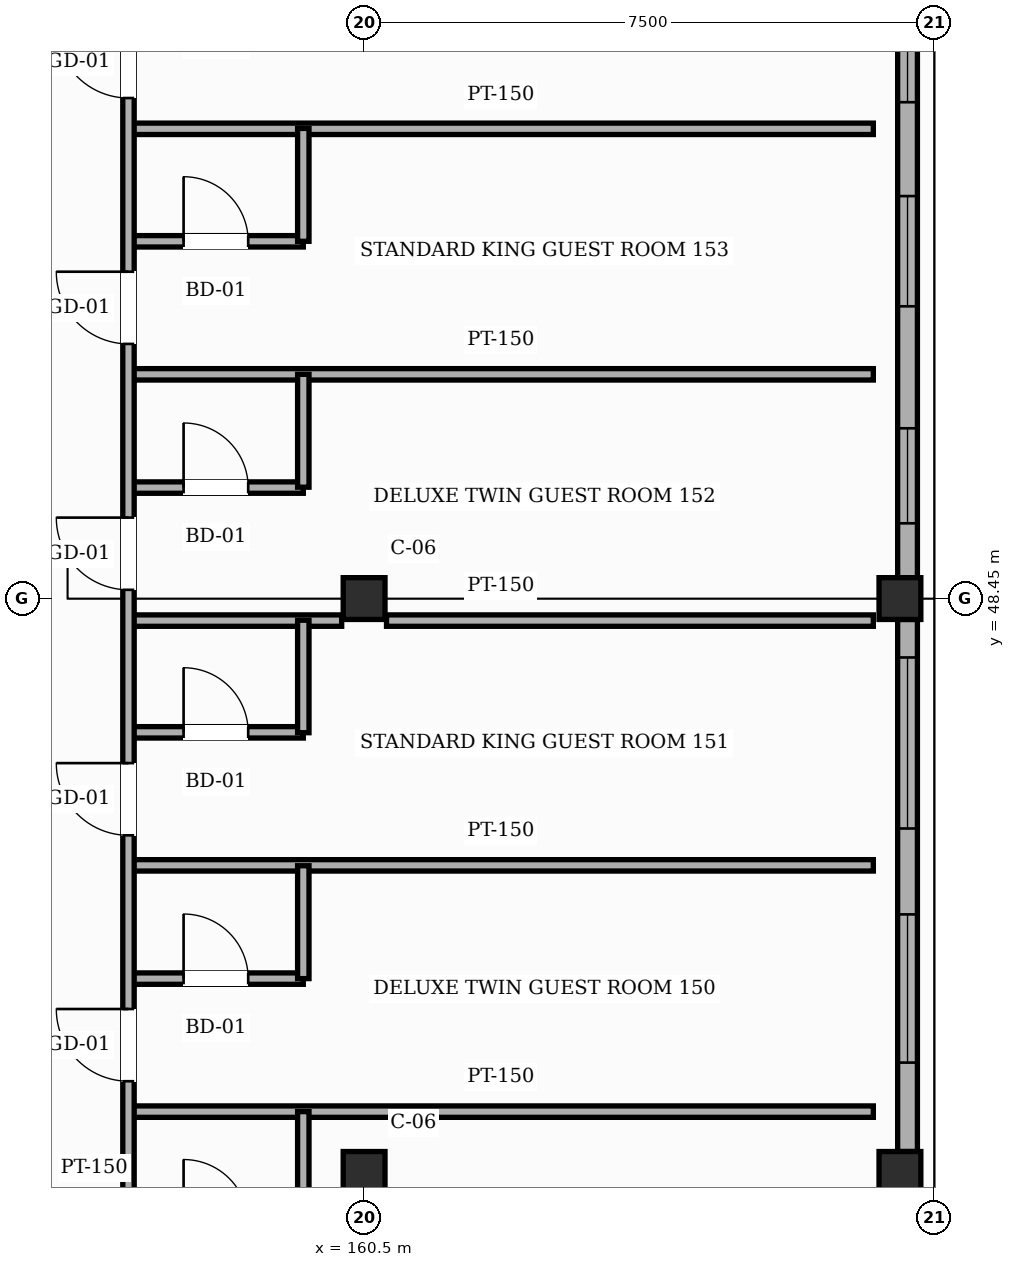
"""IFC4 building model, lengths in metres.
Left out: names, types, materials, properties, quantities, classifications, styles, units other than length and angle.
Written with IfcOpenShell. Run it as: python <this file> out.ifc"""

import sys

from ifc_helpers import new_model, si_unit, direction, frame, frame_2d, origin, origin_2d, place, context, subcontext, project, spatial, rectangle, hollow_rectangle, extrude, element, fill, save


model = new_model("IFC4")
c1 = context("Model", 3, precision=1e-05, world=origin(), true_north=direction((0.0, 1.0)))
c2 = subcontext(c1, "Body", "Model", "MODEL_VIEW")
j1 = project(units=[si_unit("LENGTHUNIT", "METRE"), si_unit("PLANEANGLEUNIT", "RADIAN")], contexts=[c1])
p1 = place(None, origin())
s1 = spatial("IfcSite", under=j1, at=p1, CompositionType="ELEMENT")
p2 = place(p1, origin())
s2 = spatial("IfcBuilding", under=s1, at=p2, CompositionType="ELEMENT")
p3 = place(p2, frame((0.0, 0.0, 28.2)))
s3 = spatial("IfcBuildingStorey", under=s2, at=p3, CompositionType="ELEMENT", Elevation=28.2)
for number, where, z_axis, x_axis in (
    (1, (160.5, 40.9, 0.0), (0.0, 0.0, 1.0), (1.0, 0.0, 0.0)),
    (2, (160.5, 48.45, 0.0), (0.0, 0.0, 1.0), (1.0, 0.0, 0.0)),
    (3, (167.55, 40.9, 0.0), (0.0, 0.0, 1.0), (1.0, 0.0, 0.0)),
    (4, (167.55, 48.45, 0.0), (0.0, 0.0, 1.0), (1.0, 0.0, 0.0)),
):
    element("IfcColumn", number, at=place(p3, frame(where, z_axis=z_axis, x_axis=x_axis)), inside=s3, PredefinedType="COLUMN", context=c2, shape_type="SweptSolid", body=[
        extrude(hollow_rectangle(XDim=0.55, YDim=0.55, WallThickness=0.022, InnerFilletRadius=0.022, OuterFilletRadius=0.044, at=origin_2d()), origin(), (0.0, 0.0, 1.0), 3.6),
    ])
p4 = place(p3, frame((167.65, 48.175, 0.0), z_axis=(0.0, 0.0, 1.0), x_axis=(0.0, -1.0, 0.0)))
e5 = element("IfcWall", 5, at=p4, inside=s3, PredefinedType="SOLIDWALL", context=c2, shape_type="SweptSolid", body=[
    extrude(rectangle(XDim=7.0, YDim=0.26, at=frame_2d((3.5, 0.0))), origin(), (0.0, 0.0, 1.0), 2.755),
])
p5 = place(p4, frame((3.88, 0.0, 0.85)))
e6 = element("IfcOpeningElement", 6, at=p5, cuts=e5, PredefinedType="OPENING", context=c2, shape_type="SweptSolid", body=[
    extrude(rectangle(XDim=1.95, YDim=1.5, at=frame_2d((0.975, 0.75))), frame((0.0, 0.14, 0.0), z_axis=(0.0, -1.0, 0.0), x_axis=(1.0, 0.0, 0.0)), (0.0, 0.0, 1.0), 0.28),
])
p6 = place(p4, frame((0.5, 0.0, 0.85)))
e7 = element("IfcOpeningElement", 7, at=p6, cuts=e5, PredefinedType="OPENING", context=c2, shape_type="SweptSolid", body=[
    extrude(rectangle(XDim=2.25, YDim=1.5, at=frame_2d((1.125, 0.75))), frame((0.0, 0.14, 0.0), z_axis=(0.0, -1.0, 0.0), x_axis=(1.0, 0.0, 0.0)), (0.0, 0.0, 1.0), 0.28),
])
p7 = place(p3, frame((167.65, 56.175, 0.0), z_axis=(0.0, 0.0, 1.0), x_axis=(0.0, -1.0, 0.0)))
e8 = element("IfcWall", 8, at=p7, inside=s3, PredefinedType="SOLIDWALL", context=c2, shape_type="SweptSolid", body=[
    extrude(rectangle(XDim=7.45, YDim=0.26, at=frame_2d((3.725, 0.0))), origin(), (0.0, 0.0, 1.0), 2.755),
])
p8 = place(p7, frame((5.485, 0.0, 0.85)))
e9 = element("IfcOpeningElement", 9, at=p8, cuts=e8, PredefinedType="OPENING", context=c2, shape_type="SweptSolid", body=[
    extrude(rectangle(XDim=1.25, YDim=1.65, at=frame_2d((0.625, 0.825))), frame((0.0, 0.14, 0.0), z_axis=(0.0, -1.0, 0.0), x_axis=(1.0, 0.0, 0.0)), (0.0, 0.0, 1.0), 0.28),
])
p9 = place(p7, frame((2.43, 0.0, 0.85)))
e10 = element("IfcOpeningElement", 10, at=p9, cuts=e8, PredefinedType="OPENING", context=c2, shape_type="SweptSolid", body=[
    extrude(rectangle(XDim=1.45, YDim=1.65, at=frame_2d((0.725, 0.825))), frame((0.0, 0.14, 0.0), z_axis=(0.0, -1.0, 0.0), x_axis=(1.0, 0.0, 0.0)), (0.0, 0.0, 1.0), 0.28),
])
p10 = place(p7, frame((0.345, 0.0, 0.85)))
e11 = element("IfcOpeningElement", 11, at=p10, cuts=e8, PredefinedType="OPENING", context=c2, shape_type="SweptSolid", body=[
    extrude(rectangle(XDim=0.85, YDim=1.35, at=frame_2d((0.425, 0.675))), frame((0.0, 0.14, 0.0), z_axis=(0.0, -1.0, 0.0), x_axis=(1.0, 0.0, 0.0)), (0.0, 0.0, 1.0), 0.28),
])
p11 = place(p3, frame((157.4, 41.7, 0.0), z_axis=(0.0, 0.0, 1.0), x_axis=(1.0, 0.0, 0.0)))
e12 = element("IfcWall", 12, at=p11, inside=s3, PredefinedType="PARTITIONING", context=c2, shape_type="SweptSolid", body=[
    extrude(rectangle(XDim=9.8, YDim=0.15, at=frame_2d((4.9, 0.0))), origin(), (0.0, 0.0, 1.0), 3.365),
])
p12 = place(p3, frame((157.4, 43.45, 0.0), z_axis=(0.0, 0.0, 1.0), x_axis=(1.0, 0.0, 0.0)))
e13 = element("IfcWall", 13, at=p12, inside=s3, PredefinedType="PARTITIONING", context=c2, shape_type="SweptSolid", body=[
    extrude(rectangle(XDim=2.3, YDim=0.15, at=frame_2d((1.15, 0.0))), origin(), (0.0, 0.0, 1.0), 3.365),
])
p13 = place(p12, frame((0.725, 0.0, 0.0)))
e14 = element("IfcOpeningElement", 14, at=p13, cuts=e13, PredefinedType="OPENING", context=c2, shape_type="SweptSolid", body=[
    extrude(rectangle(XDim=0.85, YDim=2.1, at=frame_2d((0.425, 1.05))), frame((0.0, 0.085, 0.0), z_axis=(0.0, -1.0, 0.0), x_axis=(1.0, 0.0, 0.0)), (0.0, 0.0, 1.0), 0.17),
])
p14 = place(p3, frame((157.4, 44.94, 0.0), z_axis=(0.0, 0.0, 1.0), x_axis=(1.0, 0.0, 0.0)))
e15 = element("IfcWall", 15, at=p14, inside=s3, PredefinedType="PARTITIONING", context=c2, shape_type="SweptSolid", body=[
    extrude(rectangle(XDim=9.8, YDim=0.15, at=frame_2d((4.9, 0.0))), origin(), (0.0, 0.0, 1.0), 3.055),
])
p15 = place(p3, frame((157.4, 46.69, 0.0), z_axis=(0.0, 0.0, 1.0), x_axis=(1.0, 0.0, 0.0)))
e16 = element("IfcWall", 16, at=p15, inside=s3, PredefinedType="PARTITIONING", context=c2, shape_type="SweptSolid", body=[
    extrude(rectangle(XDim=2.3, YDim=0.15, at=frame_2d((1.15, 0.0))), origin(), (0.0, 0.0, 1.0), 3.365),
])
p16 = place(p15, frame((0.725, 0.0, 0.0)))
e17 = element("IfcOpeningElement", 17, at=p16, cuts=e16, PredefinedType="OPENING", context=c2, shape_type="SweptSolid", body=[
    extrude(rectangle(XDim=0.85, YDim=2.1, at=frame_2d((0.425, 1.05))), frame((0.0, 0.085, 0.0), z_axis=(0.0, -1.0, 0.0), x_axis=(1.0, 0.0, 0.0)), (0.0, 0.0, 1.0), 0.17),
])
p17 = place(p3, frame((157.4, 48.16, 0.0), z_axis=(0.0, 0.0, 1.0), x_axis=(1.0, 0.0, 0.0)))
e18 = element("IfcWall", 18, at=p17, inside=s3, PredefinedType="PARTITIONING", context=c2, shape_type="SweptSolid", body=[
    extrude(rectangle(XDim=2.805, YDim=0.15, at=frame_2d((1.403, 0.0))), origin(), (0.0, 0.0, 1.0), 3.365),
])
p18 = place(p3, frame((160.795, 48.16, 0.0), z_axis=(0.0, 0.0, 1.0), x_axis=(1.0, 0.0, 0.0)))
e19 = element("IfcWall", 19, at=p18, inside=s3, PredefinedType="PARTITIONING", context=c2, shape_type="SweptSolid", body=[
    extrude(rectangle(XDim=6.405, YDim=0.15, at=frame_2d((3.203, 0.0))), origin(), (0.0, 0.0, 1.0), 2.755),
])
p19 = place(p3, frame((157.4, 49.91, 0.0), z_axis=(0.0, 0.0, 1.0), x_axis=(1.0, 0.0, 0.0)))
e20 = element("IfcWall", 20, at=p19, inside=s3, PredefinedType="PARTITIONING", context=c2, shape_type="SweptSolid", body=[
    extrude(rectangle(XDim=2.3, YDim=0.15, at=frame_2d((1.15, 0.0))), origin(), (0.0, 0.0, 1.0), 3.365),
])
p20 = place(p19, frame((0.725, 0.0, 0.0)))
e21 = element("IfcOpeningElement", 21, at=p20, cuts=e20, PredefinedType="OPENING", context=c2, shape_type="SweptSolid", body=[
    extrude(rectangle(XDim=0.85, YDim=2.1, at=frame_2d((0.425, 1.05))), frame((0.0, 0.085, 0.0), z_axis=(0.0, -1.0, 0.0), x_axis=(1.0, 0.0, 0.0)), (0.0, 0.0, 1.0), 0.17),
])
p21 = place(p3, frame((157.4, 51.4, 0.0), z_axis=(0.0, 0.0, 1.0), x_axis=(1.0, 0.0, 0.0)))
e22 = element("IfcWall", 22, at=p21, inside=s3, PredefinedType="PARTITIONING", context=c2, shape_type="SweptSolid", body=[
    extrude(rectangle(XDim=9.8, YDim=0.15, at=frame_2d((4.9, 0.0))), origin(), (0.0, 0.0, 1.0), 3.365),
])
p22 = place(p3, frame((157.4, 53.15, 0.0), z_axis=(0.0, 0.0, 1.0), x_axis=(1.0, 0.0, 0.0)))
e23 = element("IfcWall", 23, at=p22, inside=s3, PredefinedType="PARTITIONING", context=c2, shape_type="SweptSolid", body=[
    extrude(rectangle(XDim=2.3, YDim=0.15, at=frame_2d((1.15, 0.0))), origin(), (0.0, 0.0, 1.0), 3.365),
])
p23 = place(p22, frame((0.725, 0.0, 0.0)))
e24 = element("IfcOpeningElement", 24, at=p23, cuts=e23, PredefinedType="OPENING", context=c2, shape_type="SweptSolid", body=[
    extrude(rectangle(XDim=0.85, YDim=2.1, at=frame_2d((0.425, 1.05))), frame((0.0, 0.085, 0.0), z_axis=(0.0, -1.0, 0.0), x_axis=(1.0, 0.0, 0.0)), (0.0, 0.0, 1.0), 0.17),
])
p24 = place(p3, frame((157.4, 54.63, 0.0), z_axis=(0.0, 0.0, 1.0), x_axis=(1.0, 0.0, 0.0)))
e25 = element("IfcWall", 25, at=p24, inside=s3, PredefinedType="PARTITIONING", context=c2, shape_type="SweptSolid", body=[
    extrude(rectangle(XDim=9.8, YDim=0.15, at=frame_2d((4.9, 0.0))), origin(), (0.0, 0.0, 1.0), 3.365),
])
p25 = place(p3, frame((157.4, 22.3, 0.0), z_axis=(0.0, 0.0, 1.0), x_axis=(0.0, 1.0, 0.0)))
e26 = element("IfcWall", 26, at=p25, inside=s3, PredefinedType="PARTITIONING", context=c2, shape_type="SweptSolid", body=[
    extrude(rectangle(XDim=48.5, YDim=0.15, at=frame_2d((24.25, 0.0))), origin(), (0.0, 0.0, 1.0), 3.365),
])
p26 = place(p25, frame((0.325, 0.0, 0.0)))
e27 = element("IfcOpeningElement", 27, at=p26, cuts=e26, PredefinedType="OPENING", context=c2, shape_type="SweptSolid", body=[
    extrude(rectangle(XDim=1.1, YDim=2.2, at=frame_2d((0.55, 1.1))), frame((0.0, 0.085, 0.0), z_axis=(0.0, -1.0, 0.0), x_axis=(1.0, 0.0, 0.0)), (0.0, 0.0, 1.0), 0.17),
])
p27 = place(p25, frame((3.635, 0.0, 0.0)))
e28 = element("IfcOpeningElement", 28, at=p27, cuts=e26, PredefinedType="OPENING", context=c2, shape_type="SweptSolid", body=[
    extrude(rectangle(XDim=0.95, YDim=2.15, at=frame_2d((0.475, 1.075))), frame((0.0, 0.085, 0.0), z_axis=(0.0, -1.0, 0.0), x_axis=(1.0, 0.0, 0.0)), (0.0, 0.0, 1.0), 0.17),
])
p28 = place(p25, frame((6.865, 0.0, 0.0)))
e29 = element("IfcOpeningElement", 29, at=p28, cuts=e26, PredefinedType="OPENING", context=c2, shape_type="SweptSolid", body=[
    extrude(rectangle(XDim=0.95, YDim=2.15, at=frame_2d((0.475, 1.075))), frame((0.0, 0.085, 0.0), z_axis=(0.0, -1.0, 0.0), x_axis=(1.0, 0.0, 0.0)), (0.0, 0.0, 1.0), 0.17),
])
p29 = place(p25, frame((10.1, 0.0, 0.0)))
e30 = element("IfcOpeningElement", 30, at=p29, cuts=e26, PredefinedType="OPENING", context=c2, shape_type="SweptSolid", body=[
    extrude(rectangle(XDim=0.95, YDim=2.15, at=frame_2d((0.475, 1.075))), frame((0.0, 0.085, 0.0), z_axis=(0.0, -1.0, 0.0), x_axis=(1.0, 0.0, 0.0)), (0.0, 0.0, 1.0), 0.17),
])
p30 = place(p25, frame((13.335, 0.0, 0.0)))
e31 = element("IfcOpeningElement", 31, at=p30, cuts=e26, PredefinedType="OPENING", context=c2, shape_type="SweptSolid", body=[
    extrude(rectangle(XDim=0.95, YDim=2.15, at=frame_2d((0.475, 1.075))), frame((0.0, 0.085, 0.0), z_axis=(0.0, -1.0, 0.0), x_axis=(1.0, 0.0, 0.0)), (0.0, 0.0, 1.0), 0.17),
])
p31 = place(p25, frame((16.565, 0.0, 0.0)))
e32 = element("IfcOpeningElement", 32, at=p31, cuts=e26, PredefinedType="OPENING", context=c2, shape_type="SweptSolid", body=[
    extrude(rectangle(XDim=0.95, YDim=2.15, at=frame_2d((0.475, 1.075))), frame((0.0, 0.085, 0.0), z_axis=(0.0, -1.0, 0.0), x_axis=(1.0, 0.0, 0.0)), (0.0, 0.0, 1.0), 0.17),
])
p32 = place(p25, frame((19.8, 0.0, 0.0)))
e33 = element("IfcOpeningElement", 33, at=p32, cuts=e26, PredefinedType="OPENING", context=c2, shape_type="SweptSolid", body=[
    extrude(rectangle(XDim=0.95, YDim=2.15, at=frame_2d((0.475, 1.075))), frame((0.0, 0.085, 0.0), z_axis=(0.0, -1.0, 0.0), x_axis=(1.0, 0.0, 0.0)), (0.0, 0.0, 1.0), 0.17),
])
p33 = place(p25, frame((23.035, 0.0, 0.0)))
e34 = element("IfcOpeningElement", 34, at=p33, cuts=e26, PredefinedType="OPENING", context=c2, shape_type="SweptSolid", body=[
    extrude(rectangle(XDim=0.95, YDim=2.15, at=frame_2d((0.475, 1.075))), frame((0.0, 0.085, 0.0), z_axis=(0.0, -1.0, 0.0), x_axis=(1.0, 0.0, 0.0)), (0.0, 0.0, 1.0), 0.17),
])
p34 = place(p25, frame((26.265, 0.0, 0.0)))
e35 = element("IfcOpeningElement", 35, at=p34, cuts=e26, PredefinedType="OPENING", context=c2, shape_type="SweptSolid", body=[
    extrude(rectangle(XDim=0.95, YDim=2.15, at=frame_2d((0.475, 1.075))), frame((0.0, 0.085, 0.0), z_axis=(0.0, -1.0, 0.0), x_axis=(1.0, 0.0, 0.0)), (0.0, 0.0, 1.0), 0.17),
])
p35 = place(p25, frame((29.5, 0.0, 0.0)))
e36 = element("IfcOpeningElement", 36, at=p35, cuts=e26, PredefinedType="OPENING", context=c2, shape_type="SweptSolid", body=[
    extrude(rectangle(XDim=0.95, YDim=2.15, at=frame_2d((0.475, 1.075))), frame((0.0, 0.085, 0.0), z_axis=(0.0, -1.0, 0.0), x_axis=(1.0, 0.0, 0.0)), (0.0, 0.0, 1.0), 0.17),
])
p36 = place(p25, frame((32.735, 0.0, 0.0)))
e37 = element("IfcOpeningElement", 37, at=p36, cuts=e26, PredefinedType="OPENING", context=c2, shape_type="SweptSolid", body=[
    extrude(rectangle(XDim=0.95, YDim=2.15, at=frame_2d((0.475, 1.075))), frame((0.0, 0.085, 0.0), z_axis=(0.0, -1.0, 0.0), x_axis=(1.0, 0.0, 0.0)), (0.0, 0.0, 1.0), 0.17),
])
p37 = place(p25, frame((35.965, 0.0, 0.0)))
e38 = element("IfcOpeningElement", 38, at=p37, cuts=e26, PredefinedType="OPENING", context=c2, shape_type="SweptSolid", body=[
    extrude(rectangle(XDim=0.95, YDim=2.15, at=frame_2d((0.475, 1.075))), frame((0.0, 0.085, 0.0), z_axis=(0.0, -1.0, 0.0), x_axis=(1.0, 0.0, 0.0)), (0.0, 0.0, 1.0), 0.17),
])
p38 = place(p25, frame((39.2, 0.0, 0.0)))
e39 = element("IfcOpeningElement", 39, at=p38, cuts=e26, PredefinedType="OPENING", context=c2, shape_type="SweptSolid", body=[
    extrude(rectangle(XDim=0.95, YDim=2.15, at=frame_2d((0.475, 1.075))), frame((0.0, 0.085, 0.0), z_axis=(0.0, -1.0, 0.0), x_axis=(1.0, 0.0, 0.0)), (0.0, 0.0, 1.0), 0.17),
])
p39 = place(p25, frame((42.435, 0.0, 0.0)))
e40 = element("IfcOpeningElement", 40, at=p39, cuts=e26, PredefinedType="OPENING", context=c2, shape_type="SweptSolid", body=[
    extrude(rectangle(XDim=0.95, YDim=2.15, at=frame_2d((0.475, 1.075))), frame((0.0, 0.085, 0.0), z_axis=(0.0, -1.0, 0.0), x_axis=(1.0, 0.0, 0.0)), (0.0, 0.0, 1.0), 0.17),
])
p40 = place(p25, frame((45.665, 0.0, 0.0)))
e41 = element("IfcOpeningElement", 41, at=p40, cuts=e26, PredefinedType="OPENING", context=c2, shape_type="SweptSolid", body=[
    extrude(rectangle(XDim=0.95, YDim=2.15, at=frame_2d((0.475, 1.075))), frame((0.0, 0.085, 0.0), z_axis=(0.0, -1.0, 0.0), x_axis=(1.0, 0.0, 0.0)), (0.0, 0.0, 1.0), 0.17),
])
p41 = place(p3, frame((159.7, 40.215, 0.0), z_axis=(0.0, 0.0, 1.0), x_axis=(0.0, 1.0, 0.0)))
e42 = element("IfcWall", 42, at=p41, inside=s3, PredefinedType="PARTITIONING", context=c2, shape_type="SweptSolid", body=[
    extrude(rectangle(XDim=1.485, YDim=0.15, at=frame_2d((0.742, 0.0))), origin(), (0.0, 0.0, 1.0), 3.365),
])
p42 = place(p3, frame((159.7, 43.45, 0.0), z_axis=(0.0, 0.0, 1.0), x_axis=(0.0, 1.0, 0.0)))
e43 = element("IfcWall", 43, at=p42, inside=s3, PredefinedType="PARTITIONING", context=c2, shape_type="SweptSolid", body=[
    extrude(rectangle(XDim=1.485, YDim=0.15, at=frame_2d((0.743, 0.0))), origin(), (0.0, 0.0, 1.0), 3.365),
])
p43 = place(p3, frame((159.7, 46.685, 0.0), z_axis=(0.0, 0.0, 1.0), x_axis=(0.0, 1.0, 0.0)))
e44 = element("IfcWall", 44, at=p43, inside=s3, PredefinedType="PARTITIONING", context=c2, shape_type="SweptSolid", body=[
    extrude(rectangle(XDim=1.48, YDim=0.15, at=frame_2d((0.74, 0.0))), origin(), (0.0, 0.0, 1.0), 3.365),
])
p44 = place(p3, frame((159.7, 49.915, 0.0), z_axis=(0.0, 0.0, 1.0), x_axis=(0.0, 1.0, 0.0)))
e45 = element("IfcWall", 45, at=p44, inside=s3, PredefinedType="PARTITIONING", context=c2, shape_type="SweptSolid", body=[
    extrude(rectangle(XDim=1.485, YDim=0.15, at=frame_2d((0.742, 0.0))), origin(), (0.0, 0.0, 1.0), 3.365),
])
p45 = place(p3, frame((159.7, 53.15, 0.0), z_axis=(0.0, 0.0, 1.0), x_axis=(0.0, 1.0, 0.0)))
e46 = element("IfcWall", 46, at=p45, inside=s3, PredefinedType="PARTITIONING", context=c2, shape_type="SweptSolid", body=[
    extrude(rectangle(XDim=1.485, YDim=0.15, at=frame_2d((0.743, 0.0))), origin(), (0.0, 0.0, 1.0), 3.365),
])
p46 = place(p5, origin())
e47 = element("IfcWindow", 47, at=p46, inside=s3, PartitioningType="SINGLE_PANEL", PredefinedType="WINDOW", context=c2, shape_type="SweptSolid", body=[
    extrude(rectangle(XDim=1.95, YDim=1.5, at=frame_2d((0.975, 0.75))), frame((0.0, 0.03, 0.0), z_axis=(0.0, -1.0, 0.0), x_axis=(1.0, 0.0, 0.0)), (0.0, 0.0, 1.0), 0.06),
])
fill(e6, e47)
p47 = place(p6, origin())
e48 = element("IfcWindow", 48, at=p47, inside=s3, PartitioningType="SINGLE_PANEL", PredefinedType="WINDOW", context=c2, shape_type="SweptSolid", body=[
    extrude(rectangle(XDim=2.25, YDim=1.5, at=frame_2d((1.125, 0.75))), frame((0.0, 0.03, 0.0), z_axis=(0.0, -1.0, 0.0), x_axis=(1.0, 0.0, 0.0)), (0.0, 0.0, 1.0), 0.06),
])
fill(e7, e48)
p48 = place(p8, origin())
e49 = element("IfcWindow", 49, at=p48, inside=s3, PartitioningType="SINGLE_PANEL", PredefinedType="WINDOW", context=c2, shape_type="SweptSolid", body=[
    extrude(rectangle(XDim=1.25, YDim=1.65, at=frame_2d((0.625, 0.825))), frame((0.0, 0.03, 0.0), z_axis=(0.0, -1.0, 0.0), x_axis=(1.0, 0.0, 0.0)), (0.0, 0.0, 1.0), 0.06),
])
fill(e9, e49)
p49 = place(p9, origin())
e50 = element("IfcWindow", 50, at=p49, inside=s3, PartitioningType="SINGLE_PANEL", PredefinedType="WINDOW", context=c2, shape_type="SweptSolid", body=[
    extrude(rectangle(XDim=1.45, YDim=1.65, at=frame_2d((0.725, 0.825))), frame((0.0, 0.03, 0.0), z_axis=(0.0, -1.0, 0.0), x_axis=(1.0, 0.0, 0.0)), (0.0, 0.0, 1.0), 0.06),
])
fill(e10, e50)
p50 = place(p10, origin())
e51 = element("IfcWindow", 51, at=p50, inside=s3, PartitioningType="SINGLE_PANEL", PredefinedType="WINDOW", context=c2, shape_type="SweptSolid", body=[
    extrude(rectangle(XDim=0.85, YDim=1.35, at=frame_2d((0.425, 0.675))), frame((0.0, 0.03, 0.0), z_axis=(0.0, -1.0, 0.0), x_axis=(1.0, 0.0, 0.0)), (0.0, 0.0, 1.0), 0.06),
])
fill(e11, e51)
p51 = place(p32, origin())
e52 = element("IfcDoor", 52, at=p51, inside=s3, OperationType="SINGLE_SWING_RIGHT", PredefinedType="DOOR", context=c2, shape_type="SweptSolid", body=[
    extrude(rectangle(XDim=0.95, YDim=2.15, at=frame_2d((0.475, 1.075))), frame((0.0, 0.025, 0.0), z_axis=(0.0, -1.0, 0.0), x_axis=(1.0, 0.0, 0.0)), (0.0, 0.0, 1.0), 0.05),
])
fill(e33, e52)
p52 = place(p13, origin())
e53 = element("IfcDoor", 53, at=p52, inside=s3, OperationType="SINGLE_SWING_LEFT", PredefinedType="DOOR", context=c2, shape_type="SweptSolid", body=[
    extrude(rectangle(XDim=0.85, YDim=2.1, at=frame_2d((0.425, 1.05))), frame((0.0, 0.025, 0.0), z_axis=(0.0, -1.0, 0.0), x_axis=(1.0, 0.0, 0.0)), (0.0, 0.0, 1.0), 0.05),
])
fill(e14, e53)
p53 = place(p33, origin())
e54 = element("IfcDoor", 54, at=p53, inside=s3, OperationType="SINGLE_SWING_RIGHT", PredefinedType="DOOR", context=c2, shape_type="SweptSolid", body=[
    extrude(rectangle(XDim=0.95, YDim=2.15, at=frame_2d((0.475, 1.075))), frame((0.0, 0.025, 0.0), z_axis=(0.0, -1.0, 0.0), x_axis=(1.0, 0.0, 0.0)), (0.0, 0.0, 1.0), 0.05),
])
fill(e34, e54)
p54 = place(p16, origin())
e55 = element("IfcDoor", 55, at=p54, inside=s3, OperationType="SINGLE_SWING_LEFT", PredefinedType="DOOR", context=c2, shape_type="SweptSolid", body=[
    extrude(rectangle(XDim=0.85, YDim=2.1, at=frame_2d((0.425, 1.05))), frame((0.0, 0.025, 0.0), z_axis=(0.0, -1.0, 0.0), x_axis=(1.0, 0.0, 0.0)), (0.0, 0.0, 1.0), 0.05),
])
fill(e17, e55)
p55 = place(p34, origin())
e56 = element("IfcDoor", 56, at=p55, inside=s3, OperationType="SINGLE_SWING_RIGHT", PredefinedType="DOOR", context=c2, shape_type="SweptSolid", body=[
    extrude(rectangle(XDim=0.95, YDim=2.15, at=frame_2d((0.475, 1.075))), frame((0.0, 0.025, 0.0), z_axis=(0.0, -1.0, 0.0), x_axis=(1.0, 0.0, 0.0)), (0.0, 0.0, 1.0), 0.05),
])
fill(e35, e56)
p56 = place(p20, origin())
e57 = element("IfcDoor", 57, at=p56, inside=s3, OperationType="SINGLE_SWING_LEFT", PredefinedType="DOOR", context=c2, shape_type="SweptSolid", body=[
    extrude(rectangle(XDim=0.85, YDim=2.1, at=frame_2d((0.425, 1.05))), frame((0.0, 0.025, 0.0), z_axis=(0.0, -1.0, 0.0), x_axis=(1.0, 0.0, 0.0)), (0.0, 0.0, 1.0), 0.05),
])
fill(e21, e57)
p57 = place(p35, origin())
e58 = element("IfcDoor", 58, at=p57, inside=s3, OperationType="SINGLE_SWING_RIGHT", PredefinedType="DOOR", context=c2, shape_type="SweptSolid", body=[
    extrude(rectangle(XDim=0.95, YDim=2.15, at=frame_2d((0.475, 1.075))), frame((0.0, 0.025, 0.0), z_axis=(0.0, -1.0, 0.0), x_axis=(1.0, 0.0, 0.0)), (0.0, 0.0, 1.0), 0.05),
])
fill(e36, e58)
p58 = place(p23, origin())
e59 = element("IfcDoor", 59, at=p58, inside=s3, OperationType="SINGLE_SWING_LEFT", PredefinedType="DOOR", context=c2, shape_type="SweptSolid", body=[
    extrude(rectangle(XDim=0.85, YDim=2.1, at=frame_2d((0.425, 1.05))), frame((0.0, 0.025, 0.0), z_axis=(0.0, -1.0, 0.0), x_axis=(1.0, 0.0, 0.0)), (0.0, 0.0, 1.0), 0.05),
])
fill(e24, e59)
p59 = place(p36, origin())
e60 = element("IfcDoor", 60, at=p59, inside=s3, OperationType="SINGLE_SWING_RIGHT", PredefinedType="DOOR", context=c2, shape_type="SweptSolid", body=[
    extrude(rectangle(XDim=0.95, YDim=2.15, at=frame_2d((0.475, 1.075))), frame((0.0, 0.025, 0.0), z_axis=(0.0, -1.0, 0.0), x_axis=(1.0, 0.0, 0.0)), (0.0, 0.0, 1.0), 0.05),
])
fill(e37, e60)
save(model, sys.argv[1])
